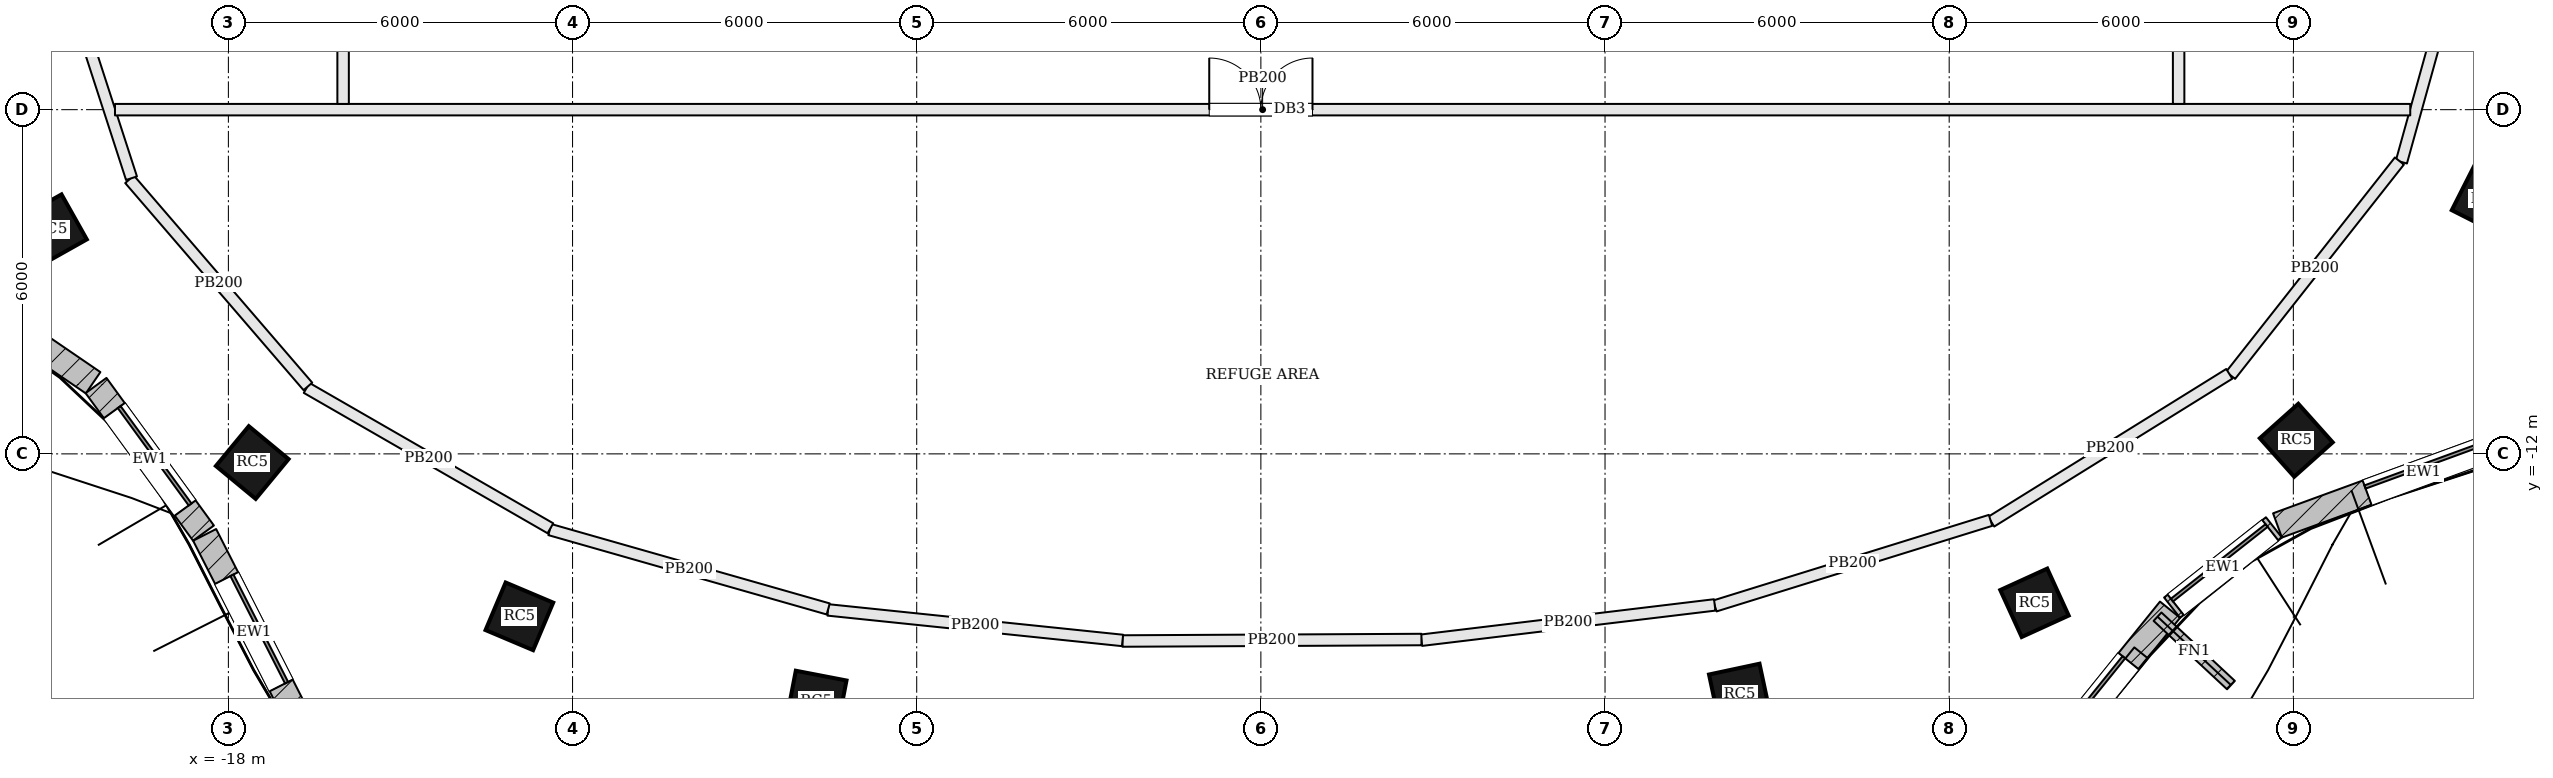
"""IFC4 building model, lengths in metres.
Left out: names, types, materials, properties, quantities, classifications, styles, units other than length and angle.
Written with IfcOpenShell. Run it as: python <this file> out.ifc"""

import sys

from ifc_helpers import new_model, si_unit, direction, frame, frame_2d, origin, origin_2d, place, context, subcontext, project, spatial, rectangle, extrude, element, fill, save


model = new_model("IFC4")
c1 = context("Model", 3, precision=1e-05, world=origin(), true_north=direction((0.0, 1.0)))
c2 = subcontext(c1, "Body", "Model", "MODEL_VIEW")
j1 = project(units=[si_unit("LENGTHUNIT", "METRE"), si_unit("PLANEANGLEUNIT", "RADIAN")], contexts=[c1])
p1 = place(None, origin())
s1 = spatial("IfcSite", under=j1, at=p1, CompositionType="ELEMENT")
p2 = place(p1, origin())
s2 = spatial("IfcBuilding", under=s1, at=p2, CompositionType="ELEMENT")
p3 = place(p2, frame((0.0, 0.0, 280.5)))
s3 = spatial("IfcBuildingStorey", under=s2, at=p3, CompositionType="ELEMENT", Elevation=280.5)
for number, where, z_axis, x_axis in (
    (1, (-21.081, -8.09, 0.0), (0.0, 0.0, 1.0), (0.49, -0.872, 0.0)),
    (2, (-17.584, -12.151, 0.0), (0.0, 0.0, 1.0), (0.771, -0.637, 0.0)),
    (3, (-12.927, -14.832, 0.0), (0.0, 0.0, 1.0), (0.921, -0.389, 0.0)),
    (4, (-7.751, -16.307, 0.0), (0.0, 0.0, 1.0), (0.982, -0.189, 0.0)),
    (5, (8.347, -16.192, 0.0), (0.0, 0.0, 1.0), (0.978, 0.209, 0.0)),
    (6, (13.487, -14.596, 0.0), (0.0, 0.0, 1.0), (0.91, 0.415, 0.0)),
    (7, (18.051, -11.763, 0.0), (0.0, 0.0, 1.0), (0.746, 0.666, 0.0)),
    (8, (21.367, -7.554, 0.0), (0.0, 0.0, 1.0), (0.452, 0.892, 0.0)),
):
    element("IfcColumn", number, at=place(p3, frame(where, z_axis=z_axis, x_axis=x_axis)), inside=s3, PredefinedType="COLUMN", context=c2, shape_type="SweptSolid", body=[
        extrude(rectangle(XDim=0.9, YDim=0.9, at=origin_2d()), origin(), (0.0, 0.0, 1.0), 3.9),
    ])
p4 = place(p3, frame((-24.69, -7.8, 0.0), z_axis=(0.0, 0.0, 1.0), x_axis=(0.825631274437, -0.564210066085, 0.0)))
e9 = element("IfcWall", 9, at=p4, inside=s3, PredefinedType="SOLIDWALL", context=c2, shape_type="SweptSolid", body=[
    extrude(rectangle(XDim=5.247, YDim=0.45, at=frame_2d((2.623, 0.0))), origin(), (0.0, 0.0, 1.0), 3.7),
])
p5 = place(p4, frame((1.573, 0.0, 0.9)))
e10 = element("IfcOpeningElement", 10, at=p5, cuts=e9, PredefinedType="OPENING", context=c2, shape_type="SweptSolid", body=[
    extrude(rectangle(XDim=2.1, YDim=2.3, at=frame_2d((1.05, 1.15))), frame((0.0, 0.235, 0.0), z_axis=(0.0, -1.0, 0.0), x_axis=(1.0, 0.0, 0.0)), (0.0, 0.0, 1.0), 0.47),
])
p6 = place(p3, frame((-20.307, -10.808, 0.0), z_axis=(0.0, 0.0, 1.0), x_axis=(0.588623179346, -0.808407541242, 0.0)))
e11 = element("IfcWall", 11, at=p6, inside=s3, PredefinedType="SOLIDWALL", context=c2, shape_type="SweptSolid", body=[
    extrude(rectangle(XDim=3.183, YDim=0.45, at=frame_2d((1.591, 0.0))), origin(), (0.0, 0.0, 1.0), 3.7),
])
p7 = place(p6, frame((0.541, 0.0, 0.9)))
e12 = element("IfcOpeningElement", 12, at=p7, cuts=e11, PredefinedType="OPENING", context=c2, shape_type="SweptSolid", body=[
    extrude(rectangle(XDim=2.1, YDim=2.3, at=frame_2d((1.05, 1.15))), frame((0.0, 0.235, 0.0), z_axis=(0.0, -1.0, 0.0), x_axis=(1.0, 0.0, 0.0)), (0.0, 0.0, 1.0), 0.47),
])
p8 = place(p3, frame((-18.414, -13.412, 0.0), z_axis=(0.0, 0.0, 1.0), x_axis=(0.453339558905, -0.891337895712, 0.0)))
e13 = element("IfcWall", 13, at=p8, inside=s3, PredefinedType="SOLIDWALL", context=c2, shape_type="SweptSolid", body=[
    extrude(rectangle(XDim=3.788, YDim=0.45, at=frame_2d((1.894, 0.0))), origin(), (0.0, 0.0, 1.0), 3.7),
])
p9 = place(p8, frame((0.844, 0.0, 0.9)))
e14 = element("IfcOpeningElement", 14, at=p9, cuts=e13, PredefinedType="OPENING", context=c2, shape_type="SweptSolid", body=[
    extrude(rectangle(XDim=2.1, YDim=2.3, at=frame_2d((1.05, 1.15))), frame((0.0, 0.235, 0.0), z_axis=(0.0, -1.0, 0.0), x_axis=(1.0, 0.0, 0.0)), (0.0, 0.0, 1.0), 0.47),
])
p10 = place(p3, frame((13.085, -18.14, 0.0), z_axis=(0.0, 0.0, 1.0), x_axis=(0.628273836344, 0.777992279245, 0.0)))
e15 = element("IfcWall", 15, at=p10, inside=s3, PredefinedType="SOLIDWALL", context=c2, shape_type="SweptSolid", body=[
    extrude(rectangle(XDim=4.401, YDim=0.45, at=frame_2d((2.201, 0.0))), origin(), (0.0, 0.0, 1.0), 3.7),
])
p11 = place(p10, frame((1.151, 0.0, 0.9)))
e16 = element("IfcOpeningElement", 16, at=p11, cuts=e15, PredefinedType="OPENING", context=c2, shape_type="SweptSolid", body=[
    extrude(rectangle(XDim=2.1, YDim=2.3, at=frame_2d((1.05, 1.15))), frame((0.0, 0.235, 0.0), z_axis=(0.0, -1.0, 0.0), x_axis=(1.0, 0.0, 0.0)), (0.0, 0.0, 1.0), 0.47),
])
p12 = place(p3, frame((15.886, -14.681, 0.0), z_axis=(0.0, 0.0, 1.0), x_axis=(0.78545189886, 0.618922704849, 0.0)))
e17 = element("IfcWall", 17, at=p12, inside=s3, PredefinedType="SOLIDWALL", context=c2, shape_type="SweptSolid", body=[
    extrude(rectangle(XDim=2.261, YDim=0.45, at=frame_2d((1.13, 0.0))), origin(), (0.0, 0.0, 1.0), 3.7),
])
p13 = place(p12, frame((0.08, 0.0, 0.9)))
e18 = element("IfcOpeningElement", 18, at=p13, cuts=e17, PredefinedType="OPENING", context=c2, shape_type="SweptSolid", body=[
    extrude(rectangle(XDim=2.1, YDim=2.3, at=frame_2d((1.05, 1.15))), frame((0.0, 0.235, 0.0), z_axis=(0.0, -1.0, 0.0), x_axis=(1.0, 0.0, 0.0)), (0.0, 0.0, 1.0), 0.47),
])
p14 = place(p3, frame((17.724, -13.247, 0.0), z_axis=(0.0, 0.0, 1.0), x_axis=(0.939241771593, 0.343256310203, 0.0)))
e19 = element("IfcWall", 19, at=p14, inside=s3, PredefinedType="SOLIDWALL", context=c2, shape_type="SweptSolid", body=[
    extrude(rectangle(XDim=5.426, YDim=0.45, at=frame_2d((2.713, 0.0))), origin(), (0.0, 0.0, 1.0), 3.7),
])
p15 = place(p14, frame((1.663, 0.0, 0.9)))
e20 = element("IfcOpeningElement", 20, at=p15, cuts=e19, PredefinedType="OPENING", context=c2, shape_type="SweptSolid", body=[
    extrude(rectangle(XDim=2.1, YDim=2.3, at=frame_2d((1.05, 1.15))), frame((0.0, 0.235, 0.0), z_axis=(0.0, -1.0, 0.0), x_axis=(1.0, 0.0, 0.0)), (0.0, 0.0, 1.0), 0.47),
])
p16 = place(p3, frame((15.632, -14.838, 0.0), z_axis=(0.0, 0.0, 1.0), x_axis=(0.73177399504, -0.681547371929, 0.0)))
e21 = element("IfcWall", 21, at=p16, inside=s3, PredefinedType="SOLIDWALL", context=c2, shape_type="SweptSolid", body=[
    extrude(rectangle(XDim=1.75, YDim=0.2, at=frame_2d((0.875, 0.0))), origin(), (0.0, 0.0, 1.0), 3.7),
])
p17 = place(p3, frame((13.194, -18.13, 3.9), z_axis=(0.0, 0.0, 1.0), x_axis=(0.628264043073, 0.778000187777, 0.0)))
e22 = element("IfcWall", 22, at=p17, inside=s3, PredefinedType="PARAPET", context=c2, shape_type="SweptSolid", body=[
    extrude(rectangle(XDim=3.422, YDim=0.3, at=frame_2d((1.711, 0.0))), origin(), (0.0, 0.0, 1.0), 1.1),
])
p18 = place(p3, frame((21.226, -2.085, 0.0), z_axis=(0.0, 0.0, 1.0), x_axis=(-0.267859993319, -0.963457847536, 0.0)))
e23 = element("IfcWall", 23, at=p18, inside=s3, PredefinedType="PARTITIONING", context=c2, shape_type="SweptSolid", body=[
    extrude(rectangle(XDim=5.01, YDim=0.2, at=frame_2d((2.505, 0.0))), origin(), (0.0, 0.0, 1.0), 3.7),
])
p19 = place(p3, frame((19.849, -6.895, 0.0), z_axis=(0.0, 0.0, 1.0), x_axis=(-0.618811760178, -0.785539308669, 0.0)))
e24 = element("IfcWall", 24, at=p19, inside=s3, PredefinedType="PARTITIONING", context=c2, shape_type="SweptSolid", body=[
    extrude(rectangle(XDim=4.756, YDim=0.2, at=frame_2d((2.378, 0.0))), origin(), (0.0, 0.0, 1.0), 3.7),
])
p20 = place(p3, frame((16.883, -10.605, 0.0), z_axis=(0.0, 0.0, 1.0), x_axis=(-0.849608511022, -0.527413858368, 0.0)))
e25 = element("IfcWall", 25, at=p20, inside=s3, PredefinedType="PARTITIONING", context=c2, shape_type="SweptSolid", body=[
    extrude(rectangle(XDim=4.886, YDim=0.2, at=frame_2d((2.443, 0.0))), origin(), (0.0, 0.0, 1.0), 3.7),
])
p21 = place(p3, frame((12.721, -13.159, 0.0), z_axis=(0.0, 0.0, 1.0), x_axis=(-0.955038559717, -0.296481617396, 0.0)))
e26 = element("IfcWall", 26, at=p21, inside=s3, PredefinedType="PARTITIONING", context=c2, shape_type="SweptSolid", body=[
    extrude(rectangle(XDim=5.032, YDim=0.2, at=frame_2d((2.516, 0.0))), origin(), (0.0, 0.0, 1.0), 3.7),
])
p22 = place(p3, frame((7.912, -14.633, 0.0), z_axis=(0.0, 0.0, 1.0), x_axis=(-0.992841344803, -0.119440629808, 0.0)))
e27 = element("IfcWall", 27, at=p22, inside=s3, PredefinedType="PARTITIONING", context=c2, shape_type="SweptSolid", body=[
    extrude(rectangle(XDim=5.149, YDim=0.2, at=frame_2d((2.574, 0.0))), origin(), (0.0, 0.0, 1.0), 3.7),
])
p23 = place(p3, frame((2.799, -15.236, 0.0), z_axis=(0.0, 0.0, 1.0), x_axis=(-0.9999876741, -0.004965042553, 0.0)))
e28 = element("IfcWall", 28, at=p23, inside=s3, PredefinedType="PARTITIONING", context=c2, shape_type="SweptSolid", body=[
    extrude(rectangle(XDim=5.212, YDim=0.2, at=frame_2d((2.606, 0.0))), origin(), (0.0, 0.0, 1.0), 3.7),
])
p24 = place(p3, frame((-2.412, -15.252, 0.0), z_axis=(0.0, 0.0, 1.0), x_axis=(-0.994673915242, 0.103071830955, 0.0)))
e29 = element("IfcWall", 29, at=p24, inside=s3, PredefinedType="PARTITIONING", context=c2, shape_type="SweptSolid", body=[
    extrude(rectangle(XDim=5.161, YDim=0.2, at=frame_2d((2.581, 0.0))), origin(), (0.0, 0.0, 1.0), 3.7),
])
p25 = place(p3, frame((-7.543, -14.703, 0.0), z_axis=(0.0, 0.0, 1.0), x_axis=(-0.961706339668, 0.27408195169, 0.0)))
e30 = element("IfcWall", 30, at=p25, inside=s3, PredefinedType="PARTITIONING", context=c2, shape_type="SweptSolid", body=[
    extrude(rectangle(XDim=5.045, YDim=0.2, at=frame_2d((2.522, 0.0))), origin(), (0.0, 0.0, 1.0), 3.7),
])
p26 = place(p3, frame((-12.386, -13.297, 0.0), z_axis=(0.0, 0.0, 1.0), x_axis=(-0.866617890559, 0.498972375751, 0.0)))
e31 = element("IfcWall", 31, at=p26, inside=s3, PredefinedType="PARTITIONING", context=c2, shape_type="SweptSolid", body=[
    extrude(rectangle(XDim=4.904, YDim=0.2, at=frame_2d((2.452, 0.0))), origin(), (0.0, 0.0, 1.0), 3.7),
])
p27 = place(p3, frame((-16.614, -10.824, 0.0), z_axis=(0.0, 0.0, 1.0), x_axis=(-0.652570543166, 0.757727976382, 0.0)))
e32 = element("IfcWall", 32, at=p27, inside=s3, PredefinedType="PARTITIONING", context=c2, shape_type="SweptSolid", body=[
    extrude(rectangle(XDim=4.764, YDim=0.2, at=frame_2d((2.382, 0.0))), origin(), (0.0, 0.0, 1.0), 3.7),
])
p28 = place(p3, frame((-19.689, -7.195, 0.0), z_axis=(0.0, 0.0, 1.0), x_axis=(-0.308517152125, 0.951218779695, 0.0)))
e33 = element("IfcWall", 33, at=p28, inside=s3, PredefinedType="PARTITIONING", context=c2, shape_type="SweptSolid", body=[
    extrude(rectangle(XDim=4.794, YDim=0.2, at=frame_2d((2.397, 0.0))), origin(), (0.0, 0.0, 1.0), 3.7),
])
p29 = place(p3, frame((-19.977, -6.0, 0.0), z_axis=(0.0, 0.0, 1.0), x_axis=(1.0, 0.0, 0.0)))
e34 = element("IfcWall", 34, at=p29, inside=s3, PredefinedType="PARTITIONING", context=c2, shape_type="SweptSolid", body=[
    extrude(rectangle(XDim=40.015, YDim=0.2, at=frame_2d((20.008, 0.0))), origin(), (0.0, 0.0, 1.0), 3.7),
])
p30 = place(p29, frame((19.077, 0.0, 0.0)))
e35 = element("IfcOpeningElement", 35, at=p30, cuts=e34, PredefinedType="OPENING", context=c2, shape_type="SweptSolid", body=[
    extrude(rectangle(XDim=1.8, YDim=2.1, at=frame_2d((0.9, 1.05))), frame((0.0, 0.11, 0.0), z_axis=(0.0, -1.0, 0.0), x_axis=(1.0, 0.0, 0.0)), (0.0, 0.0, 1.0), 0.22),
])
p31 = place(p3, frame((-16.0, 11.053, 0.0), z_axis=(0.0, 0.0, 1.0), x_axis=(0.0, -1.0, 0.0)))
e36 = element("IfcWall", 36, at=p31, inside=s3, PredefinedType="PARTITIONING", context=c2, shape_type="SweptSolid", body=[
    extrude(rectangle(XDim=16.953, YDim=0.2, at=frame_2d((8.477, 0.0))), origin(), (0.0, 0.0, 1.0), 3.7),
])
p32 = place(p31, frame((6.077, 0.0, 0.0)))
e37 = element("IfcOpeningElement", 37, at=p32, cuts=e36, PredefinedType="OPENING", context=c2, shape_type="SweptSolid", body=[
    extrude(rectangle(XDim=1.8, YDim=2.1, at=frame_2d((0.9, 1.05))), frame((0.0, 0.11, 0.0), z_axis=(0.0, -1.0, 0.0), x_axis=(1.0, 0.0, 0.0)), (0.0, 0.0, 1.0), 0.22),
])
p33 = place(p3, frame((16.0, -5.9, 0.0), z_axis=(0.0, 0.0, 1.0), x_axis=(0.0, 1.0, 0.0)))
e38 = element("IfcWall", 38, at=p33, inside=s3, PredefinedType="PARTITIONING", context=c2, shape_type="SweptSolid", body=[
    extrude(rectangle(XDim=17.017, YDim=0.2, at=frame_2d((8.508, 0.0))), origin(), (0.0, 0.0, 1.0), 3.7),
])
p34 = place(p33, frame((9.108, 0.0, 0.0)))
e39 = element("IfcOpeningElement", 39, at=p34, cuts=e38, PredefinedType="OPENING", context=c2, shape_type="SweptSolid", body=[
    extrude(rectangle(XDim=1.8, YDim=2.1, at=frame_2d((0.9, 1.05))), frame((0.0, 0.11, 0.0), z_axis=(0.0, -1.0, 0.0), x_axis=(1.0, 0.0, 0.0)), (0.0, 0.0, 1.0), 0.22),
])
p35 = place(p7, origin())
e40 = element("IfcWindow", 40, at=p35, inside=s3, PartitioningType="SINGLE_PANEL", PredefinedType="WINDOW", context=c2, shape_type="SweptSolid", body=[
    extrude(rectangle(XDim=2.1, YDim=2.3, at=frame_2d((1.05, 1.15))), frame((0.0, 0.135, 0.0), z_axis=(0.0, -1.0, 0.0), x_axis=(1.0, 0.0, 0.0)), (0.0, 0.0, 1.0), 0.06),
])
fill(e12, e40)
p36 = place(p9, origin())
e41 = element("IfcWindow", 41, at=p36, inside=s3, PartitioningType="SINGLE_PANEL", PredefinedType="WINDOW", context=c2, shape_type="SweptSolid", body=[
    extrude(rectangle(XDim=2.1, YDim=2.3, at=frame_2d((1.05, 1.15))), frame((0.0, 0.135, 0.0), z_axis=(0.0, -1.0, 0.0), x_axis=(1.0, 0.0, 0.0)), (0.0, 0.0, 1.0), 0.06),
])
fill(e14, e41)
p37 = place(p11, origin())
e42 = element("IfcWindow", 42, at=p37, inside=s3, PartitioningType="SINGLE_PANEL", PredefinedType="WINDOW", context=c2, shape_type="SweptSolid", body=[
    extrude(rectangle(XDim=2.1, YDim=2.3, at=frame_2d((1.05, 1.15))), frame((0.0, 0.135, 0.0), z_axis=(0.0, -1.0, 0.0), x_axis=(1.0, 0.0, 0.0)), (0.0, 0.0, 1.0), 0.06),
])
fill(e16, e42)
p38 = place(p13, origin())
e43 = element("IfcWindow", 43, at=p38, inside=s3, PartitioningType="SINGLE_PANEL", PredefinedType="WINDOW", context=c2, shape_type="SweptSolid", body=[
    extrude(rectangle(XDim=2.1, YDim=2.3, at=frame_2d((1.05, 1.15))), frame((0.0, 0.135, 0.0), z_axis=(0.0, -1.0, 0.0), x_axis=(1.0, 0.0, 0.0)), (0.0, 0.0, 1.0), 0.06),
])
fill(e18, e43)
p39 = place(p15, origin())
e44 = element("IfcWindow", 44, at=p39, inside=s3, PartitioningType="SINGLE_PANEL", PredefinedType="WINDOW", context=c2, shape_type="SweptSolid", body=[
    extrude(rectangle(XDim=2.1, YDim=2.3, at=frame_2d((1.05, 1.15))), frame((0.0, 0.135, 0.0), z_axis=(0.0, -1.0, 0.0), x_axis=(1.0, 0.0, 0.0)), (0.0, 0.0, 1.0), 0.06),
])
fill(e20, e44)
p40 = place(p30, origin())
e45 = element("IfcDoor", 45, at=p40, inside=s3, OperationType="DOUBLE_DOOR_SINGLE_SWING", PredefinedType="DOOR", context=c2, shape_type="SweptSolid", body=[
    extrude(rectangle(XDim=1.8, YDim=2.1, at=frame_2d((0.9, 1.05))), frame((0.0, 0.025, 0.0), z_axis=(0.0, -1.0, 0.0), x_axis=(1.0, 0.0, 0.0)), (0.0, 0.0, 1.0), 0.05),
])
fill(e35, e45)
save(model, sys.argv[1])
